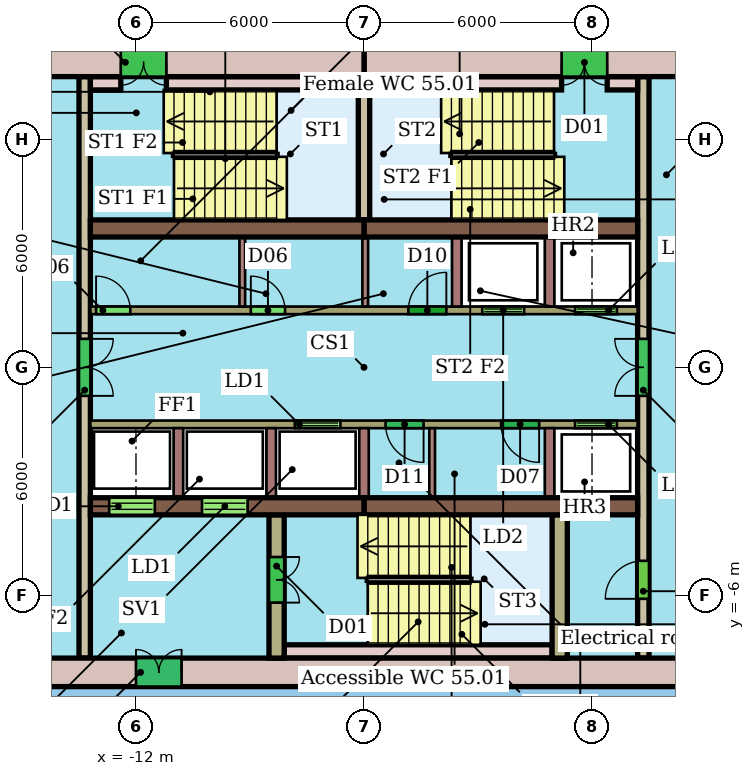
"""IFC4 building model, lengths in metres.
Left out: names, types, materials, properties, quantities, classifications, styles, units other than length and angle.
Written with IfcOpenShell. Run it as: python <this file> out.ifc"""

import sys

from ifc_helpers import new_model, si_unit, direction, frame, frame_2d, origin, place, context, subcontext, project, spatial, rectangle, extrude, element, fill, save


model = new_model("IFC4")
c1 = context("Model", 3, precision=1e-05, world=origin(), true_north=direction((0.0, 1.0)))
c2 = subcontext(c1, "Body", "Model", "MODEL_VIEW")
j1 = project(units=[si_unit("LENGTHUNIT", "METRE"), si_unit("PLANEANGLEUNIT", "RADIAN")], contexts=[c1])
p1 = place(None, origin())
s1 = spatial("IfcSite", under=j1, at=p1, CompositionType="ELEMENT")
p2 = place(p1, origin())
s2 = spatial("IfcBuilding", under=s1, at=p2, CompositionType="ELEMENT")
p3 = place(p2, frame((0.0, 0.0, 224.5)))
s3 = spatial("IfcBuildingStorey", under=s2, at=p3, CompositionType="ELEMENT", Elevation=224.5)
p4 = place(p3, frame((4.8, 8.025, 0.0), z_axis=(0.0, 0.0, 1.0), x_axis=(-1.0, 0.0, 0.0)))
e1 = element("IfcWall", 1, at=p4, inside=s3, PredefinedType="SHEAR", context=c2, shape_type="SweptSolid", body=[
    extrude(rectangle(XDim=10.8, YDim=0.75, at=frame_2d((5.4, 0.0))), origin(), (0.0, 0.0, 1.0), 3.3),
])
p5 = place(p4, frame((4.4, 0.0, 0.0)))
e2 = element("IfcOpeningElement", 2, at=p5, cuts=e1, PredefinedType="OPENING", context=c2, shape_type="SweptSolid", body=[
    extrude(rectangle(XDim=1.2, YDim=2.1, at=frame_2d((0.6, 1.05))), frame((0.0, 0.385, 0.0), z_axis=(0.0, -1.0, 0.0), x_axis=(1.0, 0.0, 0.0)), (0.0, 0.0, 1.0), 0.77),
])
p6 = place(p3, frame((-6.0, 8.025, 0.0), z_axis=(0.0, 0.0, 1.0), x_axis=(-1.0, 0.0, 0.0)))
e3 = element("IfcWall", 3, at=p6, inside=s3, PredefinedType="SHEAR", context=c2, shape_type="SweptSolid", body=[
    extrude(rectangle(XDim=10.8, YDim=0.75, at=frame_2d((5.4, 0.0))), origin(), (0.0, 0.0, 1.0), 3.3),
])
p7 = place(p6, frame((5.2, 0.0, 0.0)))
e4 = element("IfcOpeningElement", 4, at=p7, cuts=e3, PredefinedType="OPENING", context=c2, shape_type="SweptSolid", body=[
    extrude(rectangle(XDim=1.2, YDim=2.1, at=frame_2d((0.6, 1.05))), frame((0.0, 0.385, 0.0), z_axis=(0.0, -1.0, 0.0), x_axis=(1.0, 0.0, 0.0)), (0.0, 0.0, 1.0), 0.77),
])
p8 = place(p3, frame((-16.8, -8.025, 0.0), z_axis=(0.0, 0.0, 1.0), x_axis=(1.0, 0.0, 0.0)))
e5 = element("IfcWall", 5, at=p8, inside=s3, PredefinedType="SHEAR", context=c2, shape_type="SweptSolid", body=[
    extrude(rectangle(XDim=21.6, YDim=0.75, at=frame_2d((10.8, 0.0))), origin(), (0.0, 0.0, 1.0), 3.3),
])
p9 = place(p8, frame((4.8, 0.0, 0.0)))
e6 = element("IfcOpeningElement", 6, at=p9, cuts=e5, PredefinedType="OPENING", context=c2, shape_type="SweptSolid", body=[
    extrude(rectangle(XDim=1.2, YDim=2.1, at=frame_2d((0.6, 1.05))), frame((0.0, 0.385, 0.0), z_axis=(0.0, -1.0, 0.0), x_axis=(1.0, 0.0, 0.0)), (0.0, 0.0, 1.0), 0.77),
])
for number, where, z_axis, x_axis in (
    (7, (-13.2, 3.655, 0.0), (0.0, 0.0, 1.0), (1.0, 0.0, 0.0)),
    (8, (-6.0, 3.655, 0.0), (0.0, 0.0, 1.0), (1.0, 0.0, 0.0)),
):
    element("IfcWall", number, at=place(p3, frame(where, z_axis=z_axis, x_axis=x_axis)), inside=s3, PredefinedType="SHEAR", context=c2, shape_type="SweptSolid", body=[
        extrude(rectangle(XDim=7.2, YDim=0.45, at=frame_2d((3.6, 0.0))), origin(), (0.0, 0.0, 1.0), 3.3),
    ])
p10 = place(p3, frame((-13.2, -3.655, 0.0), z_axis=(0.0, 0.0, 1.0), x_axis=(1.0, 0.0, 0.0)))
e9 = element("IfcWall", 9, at=p10, inside=s3, PredefinedType="SHEAR", context=c2, shape_type="SweptSolid", body=[
    extrude(rectangle(XDim=7.2, YDim=0.45, at=frame_2d((3.6, 0.0))), origin(), (0.0, 0.0, 1.0), 3.3),
])
p11 = place(p10, frame((0.496, 0.0, 0.0)))
e10 = element("IfcOpeningElement", 10, at=p11, cuts=e9, PredefinedType="OPENING", context=c2, shape_type="SweptSolid", body=[
    extrude(rectangle(XDim=1.2, YDim=2.1, at=frame_2d((0.6, 1.05))), frame((0.0, 0.235, 0.0), z_axis=(0.0, -1.0, 0.0), x_axis=(1.0, 0.0, 0.0)), (0.0, 0.0, 1.0), 0.47),
])
p12 = place(p10, frame((2.938, 0.0, 0.0)))
e11 = element("IfcOpeningElement", 11, at=p12, cuts=e9, PredefinedType="OPENING", context=c2, shape_type="SweptSolid", body=[
    extrude(rectangle(XDim=1.2, YDim=2.1, at=frame_2d((0.6, 1.05))), frame((0.0, 0.235, 0.0), z_axis=(0.0, -1.0, 0.0), x_axis=(1.0, 0.0, 0.0)), (0.0, 0.0, 1.0), 0.47),
])
p13 = place(p3, frame((-6.0, -3.655, 0.0), z_axis=(0.0, 0.0, 1.0), x_axis=(1.0, 0.0, 0.0)))
e12 = element("IfcWall", 12, at=p13, inside=s3, PredefinedType="SHEAR", context=c2, shape_type="SweptSolid", body=[
    extrude(rectangle(XDim=7.2, YDim=0.45, at=frame_2d((3.6, 0.0))), origin(), (0.0, 0.0, 1.0), 3.3),
])
p14 = place(p3, frame((-13.35, 7.65, 0.0), z_axis=(0.0, 0.0, 1.0), x_axis=(0.0, -1.0, 0.0)))
e13 = element("IfcWall", 13, at=p14, inside=s3, PredefinedType="SHEAR", context=c2, shape_type="SweptSolid", body=[
    extrude(rectangle(XDim=15.3, YDim=0.3, at=frame_2d((7.65, 0.0))), origin(), (0.0, 0.0, 1.0), 3.3),
])
p15 = place(p14, frame((6.9, 0.0, 0.0)))
e14 = element("IfcOpeningElement", 14, at=p15, cuts=e13, PredefinedType="OPENING", context=c2, shape_type="SweptSolid", body=[
    extrude(rectangle(XDim=1.5, YDim=2.1, at=frame_2d((0.75, 1.05))), frame((0.0, 0.16, 0.0), z_axis=(0.0, -1.0, 0.0), x_axis=(1.0, 0.0, 0.0)), (0.0, 0.0, 1.0), 0.32),
])
p16 = place(p3, frame((1.35, -7.65, 0.0), z_axis=(0.0, 0.0, 1.0), x_axis=(0.0, 1.0, 0.0)))
e15 = element("IfcWall", 15, at=p16, inside=s3, PredefinedType="SHEAR", context=c2, shape_type="SweptSolid", body=[
    extrude(rectangle(XDim=15.3, YDim=0.3, at=frame_2d((7.65, 0.0))), origin(), (0.0, 0.0, 1.0), 3.3),
])
p17 = place(p16, frame((1.56, 0.0, 0.0)))
e16 = element("IfcOpeningElement", 16, at=p17, cuts=e15, PredefinedType="OPENING", context=c2, shape_type="SweptSolid", body=[
    extrude(rectangle(XDim=1.0, YDim=2.1, at=frame_2d((0.5, 1.05))), frame((0.0, 0.16, 0.0), z_axis=(0.0, -1.0, 0.0), x_axis=(1.0, 0.0, 0.0)), (0.0, 0.0, 1.0), 0.32),
])
p18 = place(p16, frame((6.9, 0.0, 0.0)))
e17 = element("IfcOpeningElement", 17, at=p18, cuts=e15, PredefinedType="OPENING", context=c2, shape_type="SweptSolid", body=[
    extrude(rectangle(XDim=1.5, YDim=2.1, at=frame_2d((0.75, 1.05))), frame((0.0, 0.16, 0.0), z_axis=(0.0, -1.0, 0.0), x_axis=(1.0, 0.0, 0.0)), (0.0, 0.0, 1.0), 0.32),
])
p19 = place(p3, frame((-13.2, 1.5, 0.0), z_axis=(0.0, 0.0, 1.0), x_axis=(1.0, 0.0, 0.0)))
e18 = element("IfcWall", 18, at=p19, inside=s3, PredefinedType="SHEAR", context=c2, shape_type="SweptSolid", body=[
    extrude(rectangle(XDim=14.4, YDim=0.2, at=frame_2d((7.2, 0.0))), origin(), (0.0, 0.0, 1.0), 3.3),
])
p20 = place(p19, frame((10.312, 0.0, 0.0)))
e19 = element("IfcOpeningElement", 19, at=p20, cuts=e18, PredefinedType="OPENING", context=c2, shape_type="SweptSolid", body=[
    extrude(rectangle(XDim=1.1, YDim=2.1, at=frame_2d((0.55, 1.05))), frame((0.0, 0.11, 0.0), z_axis=(0.0, -1.0, 0.0), x_axis=(1.0, 0.0, 0.0)), (0.0, 0.0, 1.0), 0.22),
])
p21 = place(p19, frame((12.754, 0.0, 0.0)))
e20 = element("IfcOpeningElement", 20, at=p21, cuts=e18, PredefinedType="OPENING", context=c2, shape_type="SweptSolid", body=[
    extrude(rectangle(XDim=1.1, YDim=2.1, at=frame_2d((0.55, 1.05))), frame((0.0, 0.11, 0.0), z_axis=(0.0, -1.0, 0.0), x_axis=(1.0, 0.0, 0.0)), (0.0, 0.0, 1.0), 0.22),
])
p22 = place(p19, frame((0.15, 0.0, 0.0)))
e21 = element("IfcOpeningElement", 21, at=p22, cuts=e18, PredefinedType="OPENING", context=c2, shape_type="SweptSolid", body=[
    extrude(rectangle(XDim=0.9, YDim=2.1, at=frame_2d((0.45, 1.05))), frame((0.0, 0.11, 0.0), z_axis=(0.0, -1.0, 0.0), x_axis=(1.0, 0.0, 0.0)), (0.0, 0.0, 1.0), 0.22),
])
p23 = place(p19, frame((4.222, 0.0, 0.0)))
e22 = element("IfcOpeningElement", 22, at=p23, cuts=e18, PredefinedType="OPENING", context=c2, shape_type="SweptSolid", body=[
    extrude(rectangle(XDim=0.9, YDim=2.1, at=frame_2d((0.45, 1.05))), frame((0.0, 0.11, 0.0), z_axis=(0.0, -1.0, 0.0), x_axis=(1.0, 0.0, 0.0)), (0.0, 0.0, 1.0), 0.22),
])
p24 = place(p19, frame((8.367, 0.0, 0.0)))
e23 = element("IfcOpeningElement", 23, at=p24, cuts=e18, PredefinedType="OPENING", context=c2, shape_type="SweptSolid", body=[
    extrude(rectangle(XDim=1.0, YDim=2.1, at=frame_2d((0.5, 1.05))), frame((0.0, 0.11, 0.0), z_axis=(0.0, -1.0, 0.0), x_axis=(1.0, 0.0, 0.0)), (0.0, 0.0, 1.0), 0.22),
])
p25 = place(p3, frame((1.2, -1.5, 0.0), z_axis=(0.0, 0.0, 1.0), x_axis=(-1.0, 0.0, 0.0)))
e24 = element("IfcWall", 24, at=p25, inside=s3, PredefinedType="SHEAR", context=c2, shape_type="SweptSolid", body=[
    extrude(rectangle(XDim=14.4, YDim=0.2, at=frame_2d((7.2, 0.0))), origin(), (0.0, 0.0, 1.0), 3.3),
])
p26 = place(p25, frame((7.821, 0.0, 0.0)))
e25 = element("IfcOpeningElement", 25, at=p26, cuts=e24, PredefinedType="OPENING", context=c2, shape_type="SweptSolid", body=[
    extrude(rectangle(XDim=1.2, YDim=2.1, at=frame_2d((0.6, 1.05))), frame((0.0, 0.11, 0.0), z_axis=(0.0, -1.0, 0.0), x_axis=(1.0, 0.0, 0.0)), (0.0, 0.0, 1.0), 0.22),
])
p27 = place(p25, frame((0.546, 0.0, 0.0)))
e26 = element("IfcOpeningElement", 26, at=p27, cuts=e24, PredefinedType="OPENING", context=c2, shape_type="SweptSolid", body=[
    extrude(rectangle(XDim=1.1, YDim=2.1, at=frame_2d((0.55, 1.05))), frame((0.0, 0.11, 0.0), z_axis=(0.0, -1.0, 0.0), x_axis=(1.0, 0.0, 0.0)), (0.0, 0.0, 1.0), 0.22),
])
p28 = place(p25, frame((5.632, 0.0, 0.0)))
e27 = element("IfcOpeningElement", 27, at=p28, cuts=e24, PredefinedType="OPENING", context=c2, shape_type="SweptSolid", body=[
    extrude(rectangle(XDim=1.0, YDim=2.1, at=frame_2d((0.5, 1.05))), frame((0.0, 0.11, 0.0), z_axis=(0.0, -1.0, 0.0), x_axis=(1.0, 0.0, 0.0)), (0.0, 0.0, 1.0), 0.22),
])
p29 = place(p25, frame((2.592, 0.0, 0.0)))
e28 = element("IfcOpeningElement", 28, at=p29, cuts=e24, PredefinedType="OPENING", context=c2, shape_type="SweptSolid", body=[
    extrude(rectangle(XDim=1.0, YDim=2.1, at=frame_2d((0.5, 1.05))), frame((0.0, 0.11, 0.0), z_axis=(0.0, -1.0, 0.0), x_axis=(1.0, 0.0, 0.0)), (0.0, 0.0, 1.0), 0.22),
])
p30 = place(p3, frame((-8.3, -3.88, 0.0), z_axis=(0.0, 0.0, 1.0), x_axis=(0.0, -1.0, 0.0)))
e29 = element("IfcWall", 29, at=p30, inside=s3, PredefinedType="SHEAR", context=c2, shape_type="SweptSolid", body=[
    extrude(rectangle(XDim=3.77, YDim=0.4, at=frame_2d((1.885, 0.0))), origin(), (0.0, 0.0, 1.0), 3.3),
])
p31 = place(p30, frame((1.11, 0.0, 0.0)))
e30 = element("IfcOpeningElement", 30, at=p31, cuts=e29, PredefinedType="OPENING", context=c2, shape_type="SweptSolid", body=[
    extrude(rectangle(XDim=1.2, YDim=2.1, at=frame_2d((0.6, 1.05))), frame((0.0, 0.21, 0.0), z_axis=(0.0, -1.0, 0.0), x_axis=(1.0, 0.0, 0.0)), (0.0, 0.0, 1.0), 0.42),
])
p32 = place(p3, frame((-0.85, -3.88, 0.0), z_axis=(0.0, 0.0, 1.0), x_axis=(0.0, -1.0, 0.0)))
e31 = element("IfcWall", 31, at=p32, inside=s3, PredefinedType="SHEAR", context=c2, shape_type="SweptSolid", body=[
    extrude(rectangle(XDim=3.77, YDim=0.4, at=frame_2d((1.885, 0.0))), origin(), (0.0, 0.0, 1.0), 3.3),
])
p33 = place(p3, frame((-6.0, 3.88, 0.0), z_axis=(0.0, 0.0, 1.0), x_axis=(0.0, 1.0, 0.0)))
e32 = element("IfcWall", 32, at=p33, inside=s3, PredefinedType="SHEAR", context=c2, shape_type="SweptSolid", body=[
    extrude(rectangle(XDim=3.77, YDim=0.3, at=frame_2d((1.885, 0.0))), origin(), (0.0, 0.0, 1.0), 3.3),
])
p34 = place(p3, frame((-13.2, 7.475, 0.0), z_axis=(0.0, 0.0, 1.0), x_axis=(1.0, 0.0, 0.0)))
e33 = element("IfcWall", 33, at=p34, inside=s3, PredefinedType="SHEAR", context=c2, shape_type="SweptSolid", body=[
    extrude(rectangle(XDim=0.8, YDim=0.35, at=frame_2d((0.4, 0.0))), origin(), (0.0, 0.0, 1.0), 3.3),
])
for number, where, z_axis, x_axis in (
    (34, (-11.2, 7.475, 0.0), (0.0, 0.0, 1.0), (1.0, 0.0, 0.0)),
    (35, (-5.85, 7.475, 0.0), (0.0, 0.0, 1.0), (1.0, 0.0, 0.0)),
):
    element("IfcWall", number, at=place(p3, frame(where, z_axis=z_axis, x_axis=x_axis)), inside=s3, PredefinedType="SHEAR", context=c2, shape_type="SweptSolid", body=[
        extrude(rectangle(XDim=5.05, YDim=0.35, at=frame_2d((2.525, 0.0))), origin(), (0.0, 0.0, 1.0), 3.3),
    ])
p35 = place(p3, frame((0.4, 7.475, 0.0), z_axis=(0.0, 0.0, 1.0), x_axis=(1.0, 0.0, 0.0)))
e36 = element("IfcWall", 36, at=p35, inside=s3, PredefinedType="SHEAR", context=c2, shape_type="SweptSolid", body=[
    extrude(rectangle(XDim=0.8, YDim=0.35, at=frame_2d((0.4, 0.0))), origin(), (0.0, 0.0, 1.0), 3.3),
])
p36 = place(p3, frame((-8.1, -7.475, 0.0), z_axis=(0.0, 0.0, 1.0), x_axis=(1.0, 0.0, 0.0)))
e37 = element("IfcWall", 37, at=p36, inside=s3, PredefinedType="SHEAR", context=c2, shape_type="SweptSolid", body=[
    extrude(rectangle(XDim=7.05, YDim=0.35, at=frame_2d((3.525, 0.0))), origin(), (0.0, 0.0, 1.0), 3.3),
])
for number, where, z_axis, x_axis in (
    (38, (-3.558, 1.6, 0.0), (0.0, 0.0, 1.0), (0.0, 1.0, 0.0)),
    (39, (-1.117, 1.6, 0.0), (0.0, 0.0, 1.0), (0.0, 1.0, 0.0)),
):
    element("IfcWall", number, at=place(p3, frame(where, z_axis=z_axis, x_axis=x_axis)), inside=s3, PredefinedType="SHEAR", context=c2, shape_type="SweptSolid", body=[
        extrude(rectangle(XDim=1.83, YDim=0.25, at=frame_2d((0.915, 0.0))), origin(), (0.0, 0.0, 1.0), 3.3),
    ])
for number, where, z_axis, x_axis in (
    (40, (-9.203, 1.6, 0.0), (0.0, 0.0, 1.0), (0.0, 1.0, 0.0)),
    (41, (-5.967, 1.6, 0.0), (0.0, 0.0, 1.0), (0.0, 1.0, 0.0)),
):
    element("IfcWall", number, at=place(p3, frame(where, z_axis=z_axis, x_axis=x_axis)), inside=s3, PredefinedType="PARTITIONING", context=c2, shape_type="SweptSolid", body=[
        extrude(rectangle(XDim=1.83, YDim=0.15, at=frame_2d((0.915, 0.0))), origin(), (0.0, 0.0, 1.0), 3.3),
    ])
for number, where, z_axis, x_axis in (
    (42, (-10.883, -1.6, 0.0), (0.0, 0.0, 1.0), (0.0, -1.0, 0.0)),
    (43, (-8.442, -1.6, 0.0), (0.0, 0.0, 1.0), (0.0, -1.0, 0.0)),
    (44, (-6.0, -1.6, 0.0), (0.0, 0.0, 1.0), (0.0, -1.0, 0.0)),
    (45, (-1.117, -1.6, 0.0), (0.0, 0.0, 1.0), (0.0, -1.0, 0.0)),
):
    element("IfcWall", number, at=place(p3, frame(where, z_axis=z_axis, x_axis=x_axis)), inside=s3, PredefinedType="SHEAR", context=c2, shape_type="SweptSolid", body=[
        extrude(rectangle(XDim=1.83, YDim=0.25, at=frame_2d((0.915, 0.0))), origin(), (0.0, 0.0, 1.0), 3.3),
    ])
p37 = place(p3, frame((-4.207, -1.6, 0.0), z_axis=(0.0, 0.0, 1.0), x_axis=(0.0, -1.0, 0.0)))
e46 = element("IfcWall", 46, at=p37, inside=s3, PredefinedType="PARTITIONING", context=c2, shape_type="SweptSolid", body=[
    extrude(rectangle(XDim=1.83, YDim=0.15, at=frame_2d((0.915, 0.0))), origin(), (0.0, 0.0, 1.0), 3.3),
])
p38 = place(p5, origin())
e47 = element("IfcDoor", 47, at=p38, inside=s3, OperationType="DOUBLE_DOOR_SINGLE_SWING", PredefinedType="NOTDEFINED", context=c2, shape_type="SweptSolid", body=[
    extrude(rectangle(XDim=1.2, YDim=2.1, at=frame_2d((0.6, 1.05))), frame((0.0, 0.025, 0.0), z_axis=(0.0, -1.0, 0.0), x_axis=(1.0, 0.0, 0.0)), (0.0, 0.0, 1.0), 0.05),
])
fill(e2, e47)
p39 = place(p7, origin())
e48 = element("IfcDoor", 48, at=p39, inside=s3, OperationType="DOUBLE_DOOR_SINGLE_SWING", PredefinedType="NOTDEFINED", context=c2, shape_type="SweptSolid", body=[
    extrude(rectangle(XDim=1.2, YDim=2.1, at=frame_2d((0.6, 1.05))), frame((0.0, 0.025, 0.0), z_axis=(0.0, -1.0, 0.0), x_axis=(1.0, 0.0, 0.0)), (0.0, 0.0, 1.0), 0.05),
])
fill(e4, e48)
p40 = place(p9, origin())
e49 = element("IfcDoor", 49, at=p40, inside=s3, OperationType="DOUBLE_DOOR_SINGLE_SWING", PredefinedType="NOTDEFINED", context=c2, shape_type="SweptSolid", body=[
    extrude(rectangle(XDim=1.2, YDim=2.1, at=frame_2d((0.6, 1.05))), frame((0.0, 0.025, 0.0), z_axis=(0.0, -1.0, 0.0), x_axis=(1.0, 0.0, 0.0)), (0.0, 0.0, 1.0), 0.05),
])
fill(e6, e49)
p41 = place(p11, origin())
e50 = element("IfcDoor", 50, at=p41, inside=s3, OperationType="DOUBLE_DOOR_SLIDING", PredefinedType="NOTDEFINED", context=c2, shape_type="SweptSolid", body=[
    extrude(rectangle(XDim=1.2, YDim=2.1, at=frame_2d((0.6, 1.05))), frame((0.0, 0.025, 0.0), z_axis=(0.0, -1.0, 0.0), x_axis=(1.0, 0.0, 0.0)), (0.0, 0.0, 1.0), 0.05),
])
fill(e10, e50)
p42 = place(p12, origin())
e51 = element("IfcDoor", 51, at=p42, inside=s3, OperationType="DOUBLE_DOOR_SLIDING", PredefinedType="NOTDEFINED", context=c2, shape_type="SweptSolid", body=[
    extrude(rectangle(XDim=1.2, YDim=2.1, at=frame_2d((0.6, 1.05))), frame((0.0, 0.025, 0.0), z_axis=(0.0, -1.0, 0.0), x_axis=(1.0, 0.0, 0.0)), (0.0, 0.0, 1.0), 0.05),
])
fill(e11, e51)
p43 = place(p15, origin())
e52 = element("IfcDoor", 52, at=p43, inside=s3, OperationType="DOUBLE_DOOR_SINGLE_SWING", PredefinedType="NOTDEFINED", context=c2, shape_type="SweptSolid", body=[
    extrude(rectangle(XDim=1.5, YDim=2.1, at=frame_2d((0.75, 1.05))), frame((0.0, 0.025, 0.0), z_axis=(0.0, -1.0, 0.0), x_axis=(1.0, 0.0, 0.0)), (0.0, 0.0, 1.0), 0.05),
])
fill(e14, e52)
p44 = place(p17, origin())
e53 = element("IfcDoor", 53, at=p44, inside=s3, OperationType="SINGLE_SWING_LEFT", PredefinedType="NOTDEFINED", context=c2, shape_type="SweptSolid", body=[
    extrude(rectangle(XDim=1.0, YDim=2.1, at=frame_2d((0.5, 1.05))), frame((0.0, 0.025, 0.0), z_axis=(0.0, -1.0, 0.0), x_axis=(1.0, 0.0, 0.0)), (0.0, 0.0, 1.0), 0.05),
])
fill(e16, e53)
p45 = place(p18, origin())
e54 = element("IfcDoor", 54, at=p45, inside=s3, OperationType="DOUBLE_DOOR_SINGLE_SWING", PredefinedType="NOTDEFINED", context=c2, shape_type="SweptSolid", body=[
    extrude(rectangle(XDim=1.5, YDim=2.1, at=frame_2d((0.75, 1.05))), frame((0.0, 0.025, 0.0), z_axis=(0.0, -1.0, 0.0), x_axis=(1.0, 0.0, 0.0)), (0.0, 0.0, 1.0), 0.05),
])
fill(e17, e54)
p46 = place(p20, origin())
e55 = element("IfcDoor", 55, at=p46, inside=s3, OperationType="DOUBLE_DOOR_SLIDING", PredefinedType="NOTDEFINED", context=c2, shape_type="SweptSolid", body=[
    extrude(rectangle(XDim=1.1, YDim=2.1, at=frame_2d((0.55, 1.05))), frame((0.0, 0.025, 0.0), z_axis=(0.0, -1.0, 0.0), x_axis=(1.0, 0.0, 0.0)), (0.0, 0.0, 1.0), 0.05),
])
fill(e19, e55)
p47 = place(p21, origin())
e56 = element("IfcDoor", 56, at=p47, inside=s3, OperationType="DOUBLE_DOOR_SLIDING", PredefinedType="NOTDEFINED", context=c2, shape_type="SweptSolid", body=[
    extrude(rectangle(XDim=1.1, YDim=2.1, at=frame_2d((0.55, 1.05))), frame((0.0, 0.025, 0.0), z_axis=(0.0, -1.0, 0.0), x_axis=(1.0, 0.0, 0.0)), (0.0, 0.0, 1.0), 0.05),
])
fill(e20, e56)
p48 = place(p22, origin())
e57 = element("IfcDoor", 57, at=p48, inside=s3, OperationType="SINGLE_SWING_LEFT", PredefinedType="NOTDEFINED", context=c2, shape_type="SweptSolid", body=[
    extrude(rectangle(XDim=0.9, YDim=2.1, at=frame_2d((0.45, 1.05))), frame((0.0, 0.025, 0.0), z_axis=(0.0, -1.0, 0.0), x_axis=(1.0, 0.0, 0.0)), (0.0, 0.0, 1.0), 0.05),
])
fill(e21, e57)
p49 = place(p23, origin())
e58 = element("IfcDoor", 58, at=p49, inside=s3, OperationType="SINGLE_SWING_LEFT", PredefinedType="NOTDEFINED", context=c2, shape_type="SweptSolid", body=[
    extrude(rectangle(XDim=0.9, YDim=2.1, at=frame_2d((0.45, 1.05))), frame((0.0, 0.025, 0.0), z_axis=(0.0, -1.0, 0.0), x_axis=(1.0, 0.0, 0.0)), (0.0, 0.0, 1.0), 0.05),
])
fill(e22, e58)
p50 = place(p24, origin())
e59 = element("IfcDoor", 59, at=p50, inside=s3, OperationType="SINGLE_SWING_RIGHT", PredefinedType="NOTDEFINED", context=c2, shape_type="SweptSolid", body=[
    extrude(rectangle(XDim=1.0, YDim=2.1, at=frame_2d((0.5, 1.05))), frame((0.0, 0.025, 0.0), z_axis=(0.0, -1.0, 0.0), x_axis=(1.0, 0.0, 0.0)), (0.0, 0.0, 1.0), 0.05),
])
fill(e23, e59)
p51 = place(p26, origin())
e60 = element("IfcDoor", 60, at=p51, inside=s3, OperationType="DOUBLE_DOOR_SLIDING", PredefinedType="NOTDEFINED", context=c2, shape_type="SweptSolid", body=[
    extrude(rectangle(XDim=1.2, YDim=2.1, at=frame_2d((0.6, 1.05))), frame((0.0, 0.025, 0.0), z_axis=(0.0, -1.0, 0.0), x_axis=(1.0, 0.0, 0.0)), (0.0, 0.0, 1.0), 0.05),
])
fill(e25, e60)
p52 = place(p27, origin())
e61 = element("IfcDoor", 61, at=p52, inside=s3, OperationType="DOUBLE_DOOR_SLIDING", PredefinedType="NOTDEFINED", context=c2, shape_type="SweptSolid", body=[
    extrude(rectangle(XDim=1.1, YDim=2.1, at=frame_2d((0.55, 1.05))), frame((0.0, 0.025, 0.0), z_axis=(0.0, -1.0, 0.0), x_axis=(1.0, 0.0, 0.0)), (0.0, 0.0, 1.0), 0.05),
])
fill(e26, e61)
p53 = place(p28, origin())
e62 = element("IfcDoor", 62, at=p53, inside=s3, OperationType="SINGLE_SWING_LEFT", PredefinedType="NOTDEFINED", context=c2, shape_type="SweptSolid", body=[
    extrude(rectangle(XDim=1.0, YDim=2.1, at=frame_2d((0.5, 1.05))), frame((0.0, 0.025, 0.0), z_axis=(0.0, -1.0, 0.0), x_axis=(1.0, 0.0, 0.0)), (0.0, 0.0, 1.0), 0.05),
])
fill(e27, e62)
p54 = place(p29, origin())
e63 = element("IfcDoor", 63, at=p54, inside=s3, OperationType="SINGLE_SWING_LEFT", PredefinedType="NOTDEFINED", context=c2, shape_type="SweptSolid", body=[
    extrude(rectangle(XDim=1.0, YDim=2.1, at=frame_2d((0.5, 1.05))), frame((0.0, 0.025, 0.0), z_axis=(0.0, -1.0, 0.0), x_axis=(1.0, 0.0, 0.0)), (0.0, 0.0, 1.0), 0.05),
])
fill(e28, e63)
p55 = place(p31, origin())
e64 = element("IfcDoor", 64, at=p55, inside=s3, OperationType="DOUBLE_DOOR_SINGLE_SWING", PredefinedType="NOTDEFINED", context=c2, shape_type="SweptSolid", body=[
    extrude(rectangle(XDim=1.2, YDim=2.1, at=frame_2d((0.6, 1.05))), frame((0.0, 0.025, 0.0), z_axis=(0.0, -1.0, 0.0), x_axis=(1.0, 0.0, 0.0)), (0.0, 0.0, 1.0), 0.05),
])
fill(e30, e64)
save(model, sys.argv[1])
